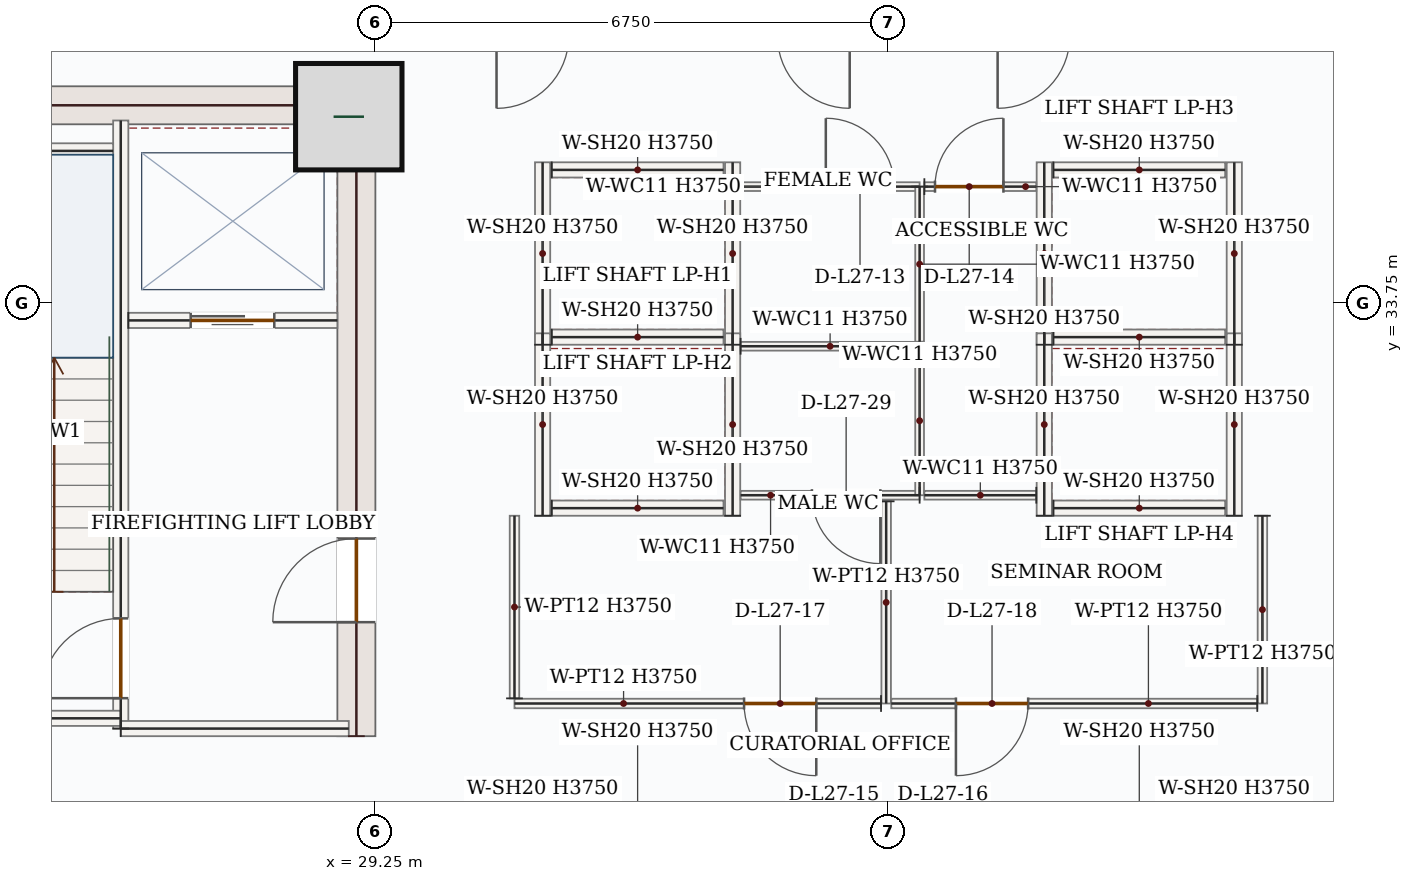
"""IFC4 building model, lengths in metres.
Left out: names, types, materials, properties, quantities, classifications, styles, units other than length and angle.
Written with IfcOpenShell. Run it as: python <this file> out.ifc"""

import sys

from ifc_helpers import new_model, si_unit, direction, frame, frame_2d, origin, origin_2d, place, context, subcontext, project, spatial, rectangle, extrude, source, transform, mapped, element, fill, save


model = new_model("IFC4")
c1 = context("Model", 3, precision=1e-05, world=origin(), true_north=direction((0.0, 1.0)))
c2 = subcontext(c1, "Body", "Model", "MODEL_VIEW")
j1 = project(units=[si_unit("LENGTHUNIT", "METRE"), si_unit("PLANEANGLEUNIT", "RADIAN")], contexts=[c1])
p1 = place(None, origin())
s1 = spatial("IfcSite", under=j1, at=p1, CompositionType="ELEMENT")
p2 = place(p1, origin())
s2 = spatial("IfcBuilding", under=s1, at=p2, CompositionType="ELEMENT")
p3 = place(p2, frame((0.0, 0.0, 121.5)))
s3 = spatial("IfcBuildingStorey", under=s2, at=p3, CompositionType="ELEMENT", Elevation=121.5)
p4 = place(p3, frame((29.0, 28.05, 0.0), z_axis=(0.0, 0.0, 1.0), x_axis=(0.0, 1.0, 0.0)))
e1 = element("IfcWall", 1, at=p4, inside=s3, PredefinedType="SHEAR", context=c2, shape_type="SweptSolid", body=[
    extrude(rectangle(XDim=8.55, YDim=0.5, at=frame_2d((4.275, 0.0))), origin(), (0.0, 0.0, 1.0), 3.75),
])
p5 = place(p4, frame((1.5, 0.0, 0.0)))
e2 = element("IfcOpeningElement", 2, at=p5, cuts=e1, PredefinedType="OPENING", context=c2, shape_type="SweptSolid", body=[
    extrude(rectangle(XDim=1.1, YDim=2.2, at=frame_2d((0.55, 1.1))), frame((0.0, 0.26, 0.0), z_axis=(0.0, -1.0, 0.0), x_axis=(1.0, 0.0, 0.0)), (0.0, 0.0, 1.0), 0.52),
])
m1 = source(origin(), c2, "Body", "SweptSolid", [
    extrude(rectangle(XDim=7.0, YDim=0.5, at=frame_2d((3.5, 0.0))), origin(), (0.0, 0.0, 1.0), 3.75),
])
p6 = place(p3, frame((21.75, 36.35, 0.0), z_axis=(0.0, 0.0, 1.0), x_axis=(1.0, 0.0, 0.0)))
e3 = element("IfcWall", 3, at=p6, inside=s3, PredefinedType="SHEAR", context=c2, shape_type="MappedRepresentation", body=[
    mapped(m1, transform((0.0, 0.0, 0.0), x_axis=(1.0, 0.0, 0.0), y_axis=(0.0, 1.0, 0.0), z_axis=(0.0, 0.0, 1.0), scale=1.0)),
])
m2 = source(origin(), c2, "Body", "SweptSolid", [
    extrude(rectangle(XDim=1.4, YDim=1.4, at=origin_2d()), origin(), (0.0, 0.0, 1.0), 4.2),
])
p7 = place(p3, frame((28.9, 36.2, 0.0), z_axis=(0.0, 0.0, 1.0), x_axis=(1.0, 0.0, 0.0)))
e4 = element("IfcColumn", 4, at=p7, inside=s3, PredefinedType="COLUMN", context=c2, shape_type="MappedRepresentation", body=[
    mapped(m2, transform((0.0, 0.0, 0.0), x_axis=(1.0, 0.0, 0.0), y_axis=(0.0, 1.0, 0.0), z_axis=(0.0, 0.0, 1.0), scale=1.0)),
])
p8 = place(p3, frame((25.9, 28.15, 0.0), z_axis=(0.0, 0.0, 1.0), x_axis=(0.0, 1.0, 0.0)))
e5 = element("IfcWall", 5, at=p8, inside=s3, PredefinedType="SOLIDWALL", context=c2, shape_type="SweptSolid", body=[
    extrude(rectangle(XDim=8.0, YDim=0.2, at=frame_2d((4.0, 0.0))), origin(), (0.0, 0.0, 1.0), 3.75),
])
p9 = place(p8, frame((0.4, 0.0, 0.0)))
e6 = element("IfcOpeningElement", 6, at=p9, cuts=e5, PredefinedType="OPENING", context=c2, shape_type="SweptSolid", body=[
    extrude(rectangle(XDim=1.05, YDim=2.15, at=frame_2d((0.525, 1.075))), frame((0.0, 0.11, 0.0), z_axis=(0.0, -1.0, 0.0), x_axis=(1.0, 0.0, 0.0)), (0.0, 0.0, 1.0), 0.22),
])
m3 = source(origin(), c2, "Body", "SweptSolid", [
    extrude(rectangle(XDim=4.25, YDim=0.2, at=frame_2d((2.125, 0.0))), origin(), (0.0, 0.0, 1.0), 3.75),
])
p10 = place(p3, frame((21.65, 28.285, 0.0), z_axis=(0.0, 0.0, 1.0), x_axis=(1.0, 0.0, 0.0)))
e7 = element("IfcWall", 7, at=p10, inside=s3, PredefinedType="SOLIDWALL", context=c2, shape_type="MappedRepresentation", body=[
    mapped(m3, transform((0.0, 0.0, 0.0), x_axis=(1.0, 0.0, 0.0), y_axis=(0.0, 1.0, 0.0), z_axis=(0.0, 0.0, 1.0), scale=1.0)),
])
m4 = source(origin(), c2, "Body", "SweptSolid", [
    extrude(rectangle(XDim=3.0, YDim=0.2, at=frame_2d((1.5, 0.0))), origin(), (0.0, 0.0, 1.0), 3.75),
])
p11 = place(p3, frame((25.9, 28.15, 0.0), z_axis=(0.0, 0.0, 1.0), x_axis=(1.0, 0.0, 0.0)))
e8 = element("IfcWall", 8, at=p11, inside=s3, PredefinedType="SOLIDWALL", context=c2, shape_type="MappedRepresentation", body=[
    mapped(m4, transform((0.0, 0.0, 0.0), x_axis=(1.0, 0.0, 0.0), y_axis=(0.0, 1.0, 0.0), z_axis=(0.0, 0.0, 1.0), scale=1.0)),
])
m5 = source(origin(), c2, "Body", "SweptSolid", [
    extrude(rectangle(XDim=3.25, YDim=0.2, at=frame_2d((1.625, 0.0))), origin(), (0.0, 0.0, 1.0), 3.75),
])
p12 = place(p3, frame((22.55, 35.75, 0.0), z_axis=(0.0, 0.0, 1.0), x_axis=(1.0, 0.0, 0.0)))
e9 = element("IfcWall", 9, at=p12, inside=s3, PredefinedType="SOLIDWALL", context=c2, shape_type="MappedRepresentation", body=[
    mapped(m5, transform((0.0, 0.0, 0.0), x_axis=(1.0, 0.0, 0.0), y_axis=(0.0, 1.0, 0.0), z_axis=(0.0, 0.0, 1.0), scale=1.0)),
])
p13 = place(p3, frame((26.0, 33.52, 0.0), z_axis=(0.0, 0.0, 1.0), x_axis=(1.0, 0.0, 0.0)))
e10 = element("IfcWall", 10, at=p13, inside=s3, PredefinedType="SOLIDWALL", context=c2, shape_type="SweptSolid", body=[
    extrude(rectangle(XDim=2.75, YDim=0.2, at=frame_2d((1.375, 0.0))), origin(), (0.0, 0.0, 1.0), 3.75),
])
p14 = place(p13, frame((0.82, 0.0, 0.0)))
e11 = element("IfcOpeningElement", 11, at=p14, cuts=e10, PredefinedType="OPENING", context=c2, shape_type="SweptSolid", body=[
    extrude(rectangle(XDim=1.1, YDim=2.15, at=frame_2d((0.55, 1.075))), frame((0.0, 0.11, 0.0), z_axis=(0.0, -1.0, 0.0), x_axis=(1.0, 0.0, 0.0)), (0.0, 0.0, 1.0), 0.22),
])
m6 = source(origin(), c2, "Body", "SweptSolid", [
    extrude(rectangle(XDim=2.4, YDim=0.2, at=frame_2d((1.2, 0.0))), origin(), (0.0, 0.0, 1.0), 3.75),
])
for number, where, z_axis, x_axis in (
    (12, (31.45, 33.2, 0.0), (0.0, 0.0, 1.0), (0.0, 1.0, 0.0)),
    (13, (33.95, 33.2, 0.0), (0.0, 0.0, 1.0), (0.0, 1.0, 0.0)),
):
    element("IfcWall", number, at=place(p3, frame(where, z_axis=z_axis, x_axis=x_axis)), inside=s3, PredefinedType="SOLIDWALL", context=c2, shape_type="MappedRepresentation", body=[
        mapped(m6, transform((0.0, 0.0, 0.0), x_axis=(1.0, 0.0, 0.0), y_axis=(0.0, 1.0, 0.0), z_axis=(0.0, 0.0, 1.0), scale=1.0)),
    ])
m7 = source(origin(), c2, "Body", "SweptSolid", [
    extrude(rectangle(XDim=2.26, YDim=0.2, at=frame_2d((1.13, 0.0))), origin(), (0.0, 0.0, 1.0), 3.75),
])
for number, where, z_axis, x_axis in (
    (14, (31.57, 33.3, 0.0), (0.0, 0.0, 1.0), (1.0, 0.0, 0.0)),
    (15, (31.57, 35.5, 0.0), (0.0, 0.0, 1.0), (1.0, 0.0, 0.0)),
):
    element("IfcWall", number, at=place(p3, frame(where, z_axis=z_axis, x_axis=x_axis)), inside=s3, PredefinedType="SOLIDWALL", context=c2, shape_type="MappedRepresentation", body=[
        mapped(m7, transform((0.0, 0.0, 0.0), x_axis=(1.0, 0.0, 0.0), y_axis=(0.0, 1.0, 0.0), z_axis=(0.0, 0.0, 1.0), scale=1.0)),
    ])
for number, where, z_axis, x_axis in (
    (16, (31.45, 30.95, 0.0), (0.0, 0.0, 1.0), (0.0, 1.0, 0.0)),
    (17, (33.95, 30.95, 0.0), (0.0, 0.0, 1.0), (0.0, 1.0, 0.0)),
):
    element("IfcWall", number, at=place(p3, frame(where, z_axis=z_axis, x_axis=x_axis)), inside=s3, PredefinedType="SOLIDWALL", context=c2, shape_type="MappedRepresentation", body=[
        mapped(m6, transform((0.0, 0.0, 0.0), x_axis=(1.0, 0.0, 0.0), y_axis=(0.0, 1.0, 0.0), z_axis=(0.0, 0.0, 1.0), scale=1.0)),
    ])
p15 = place(p3, frame((31.57, 31.05, 0.0), z_axis=(0.0, 0.0, 1.0), x_axis=(1.0, 0.0, 0.0)))
e18 = element("IfcWall", 18, at=p15, inside=s3, PredefinedType="SOLIDWALL", context=c2, shape_type="MappedRepresentation", body=[
    mapped(m7, transform((0.0, 0.0, 0.0), x_axis=(1.0, 0.0, 0.0), y_axis=(0.0, 1.0, 0.0), z_axis=(0.0, 0.0, 1.0), scale=1.0)),
])
for number, where, z_axis, x_axis in (
    (19, (38.05, 33.2, 0.0), (0.0, 0.0, 1.0), (0.0, 1.0, 0.0)),
    (20, (40.55, 33.2, 0.0), (0.0, 0.0, 1.0), (0.0, 1.0, 0.0)),
):
    element("IfcWall", number, at=place(p3, frame(where, z_axis=z_axis, x_axis=x_axis)), inside=s3, PredefinedType="SOLIDWALL", context=c2, shape_type="MappedRepresentation", body=[
        mapped(m6, transform((0.0, 0.0, 0.0), x_axis=(1.0, 0.0, 0.0), y_axis=(0.0, 1.0, 0.0), z_axis=(0.0, 0.0, 1.0), scale=1.0)),
    ])
for number, where, z_axis, x_axis in (
    (21, (38.17, 33.3, 0.0), (0.0, 0.0, 1.0), (1.0, 0.0, 0.0)),
    (22, (38.17, 35.5, 0.0), (0.0, 0.0, 1.0), (1.0, 0.0, 0.0)),
):
    element("IfcWall", number, at=place(p3, frame(where, z_axis=z_axis, x_axis=x_axis)), inside=s3, PredefinedType="SOLIDWALL", context=c2, shape_type="MappedRepresentation", body=[
        mapped(m7, transform((0.0, 0.0, 0.0), x_axis=(1.0, 0.0, 0.0), y_axis=(0.0, 1.0, 0.0), z_axis=(0.0, 0.0, 1.0), scale=1.0)),
    ])
for number, where, z_axis, x_axis in (
    (23, (38.05, 30.95, 0.0), (0.0, 0.0, 1.0), (0.0, 1.0, 0.0)),
    (24, (40.55, 30.95, 0.0), (0.0, 0.0, 1.0), (0.0, 1.0, 0.0)),
):
    element("IfcWall", number, at=place(p3, frame(where, z_axis=z_axis, x_axis=x_axis)), inside=s3, PredefinedType="SOLIDWALL", context=c2, shape_type="MappedRepresentation", body=[
        mapped(m6, transform((0.0, 0.0, 0.0), x_axis=(1.0, 0.0, 0.0), y_axis=(0.0, 1.0, 0.0), z_axis=(0.0, 0.0, 1.0), scale=1.0)),
    ])
p16 = place(p3, frame((38.17, 31.05, 0.0), z_axis=(0.0, 0.0, 1.0), x_axis=(1.0, 0.0, 0.0)))
e25 = element("IfcWall", 25, at=p16, inside=s3, PredefinedType="SOLIDWALL", context=c2, shape_type="MappedRepresentation", body=[
    mapped(m7, transform((0.0, 0.0, 0.0), x_axis=(1.0, 0.0, 0.0), y_axis=(0.0, 1.0, 0.0), z_axis=(0.0, 0.0, 1.0), scale=1.0)),
])
p17 = place(p3, frame((36.41, 31.22, 0.0), z_axis=(0.0, 0.0, 1.0), x_axis=(-1.0, 0.0, 0.0)))
e26 = element("IfcWall", 26, at=p17, inside=s3, PredefinedType="PARTITIONING", context=c2, shape_type="SweptSolid", body=[
    extrude(rectangle(XDim=2.355, YDim=0.115, at=frame_2d((1.177, 0.0))), origin(), (0.0, 0.0, 1.0), 3.75),
])
p18 = place(p17, frame((0.517, 0.0, 0.0)))
e27 = element("IfcOpeningElement", 27, at=p18, cuts=e26, PredefinedType="OPENING", context=c2, shape_type="SweptSolid", body=[
    extrude(rectangle(XDim=0.9, YDim=2.1, at=frame_2d((0.45, 1.05))), frame((0.0, 0.067, 0.0), z_axis=(0.0, -1.0, 0.0), x_axis=(1.0, 0.0, 0.0)), (0.0, 0.0, 1.0), 0.135),
])
m8 = source(origin(), c2, "Body", "SweptSolid", [
    extrude(rectangle(XDim=2.355, YDim=0.115, at=frame_2d((1.177, 0.0))), origin(), (0.0, 0.0, 1.0), 3.75),
])
p19 = place(p3, frame((34.055, 33.18, 0.0), z_axis=(0.0, 0.0, 1.0), x_axis=(1.0, 0.0, 0.0)))
e28 = element("IfcWall", 28, at=p19, inside=s3, PredefinedType="PARTITIONING", context=c2, shape_type="MappedRepresentation", body=[
    mapped(m8, transform((0.0, 0.0, 0.0), x_axis=(1.0, 0.0, 0.0), y_axis=(0.0, 1.0, 0.0), z_axis=(0.0, 0.0, 1.0), scale=1.0)),
])
m9 = source(origin(), c2, "Body", "SweptSolid", [
    extrude(rectangle(XDim=1.96, YDim=0.115, at=frame_2d((0.98, 0.0))), origin(), (0.0, 0.0, 1.0), 3.75),
])
p20 = place(p3, frame((36.41, 33.18, 0.0), z_axis=(0.0, 0.0, 1.0), x_axis=(0.0, -1.0, 0.0)))
e29 = element("IfcWall", 29, at=p20, inside=s3, PredefinedType="PARTITIONING", context=c2, shape_type="MappedRepresentation", body=[
    mapped(m9, transform((0.0, 0.0, 0.0), x_axis=(1.0, 0.0, 0.0), y_axis=(0.0, 1.0, 0.0), z_axis=(0.0, 0.0, 1.0), scale=1.0)),
])
p21 = place(p3, frame((34.055, 35.28, 0.0), z_axis=(0.0, 0.0, 1.0), x_axis=(1.0, 0.0, 0.0)))
e30 = element("IfcWall", 30, at=p21, inside=s3, PredefinedType="PARTITIONING", context=c2, shape_type="SweptSolid", body=[
    extrude(rectangle(XDim=2.355, YDim=0.115, at=frame_2d((1.177, 0.0))), origin(), (0.0, 0.0, 1.0), 3.75),
])
p22 = place(p21, frame((1.121, 0.0, 0.0)))
e31 = element("IfcOpeningElement", 31, at=p22, cuts=e30, PredefinedType="OPENING", context=c2, shape_type="SweptSolid", body=[
    extrude(rectangle(XDim=0.9, YDim=2.1, at=frame_2d((0.45, 1.05))), frame((0.0, 0.067, 0.0), z_axis=(0.0, -1.0, 0.0), x_axis=(1.0, 0.0, 0.0)), (0.0, 0.0, 1.0), 0.135),
])
m10 = source(origin(), c2, "Body", "SweptSolid", [
    extrude(rectangle(XDim=2.04, YDim=0.115, at=frame_2d((1.02, 0.0))), origin(), (0.0, 0.0, 1.0), 3.75),
])
p23 = place(p3, frame((36.41, 35.28, 0.0), z_axis=(0.0, 0.0, 1.0), x_axis=(0.0, -1.0, 0.0)))
e32 = element("IfcWall", 32, at=p23, inside=s3, PredefinedType="PARTITIONING", context=c2, shape_type="MappedRepresentation", body=[
    mapped(m10, transform((0.0, 0.0, 0.0), x_axis=(1.0, 0.0, 0.0), y_axis=(0.0, 1.0, 0.0), z_axis=(0.0, 0.0, 1.0), scale=1.0)),
])
m11 = source(origin(), c2, "Body", "SweptSolid", [
    extrude(rectangle(XDim=1.473, YDim=0.115, at=frame_2d((0.736, 0.0))), origin(), (0.0, 0.0, 1.0), 3.75),
])
p24 = place(p3, frame((37.945, 31.22, 0.0), z_axis=(0.0, 0.0, 1.0), x_axis=(-1.0, 0.0, 0.0)))
e33 = element("IfcWall", 33, at=p24, inside=s3, PredefinedType="PARTITIONING", context=c2, shape_type="MappedRepresentation", body=[
    mapped(m11, transform((0.0, 0.0, 0.0), x_axis=(1.0, 0.0, 0.0), y_axis=(0.0, 1.0, 0.0), z_axis=(0.0, 0.0, 1.0), scale=1.0)),
])
p25 = place(p3, frame((36.472, 35.28, 0.0), z_axis=(0.0, 0.0, 1.0), x_axis=(1.0, 0.0, 0.0)))
e34 = element("IfcWall", 34, at=p25, inside=s3, PredefinedType="PARTITIONING", context=c2, shape_type="SweptSolid", body=[
    extrude(rectangle(XDim=1.473, YDim=0.115, at=frame_2d((0.736, 0.0))), origin(), (0.0, 0.0, 1.0), 3.75),
])
p26 = place(p25, frame((0.14, 0.0, 0.0)))
e35 = element("IfcOpeningElement", 35, at=p26, cuts=e34, PredefinedType="OPENING", context=c2, shape_type="SweptSolid", body=[
    extrude(rectangle(XDim=0.9, YDim=2.1, at=frame_2d((0.45, 1.05))), frame((0.0, 0.067, 0.0), z_axis=(0.0, -1.0, 0.0), x_axis=(1.0, 0.0, 0.0)), (0.0, 0.0, 1.0), 0.135),
])
m12 = source(origin(), c2, "Body", "SweptSolid", [
    extrude(rectangle(XDim=2.66, YDim=0.125, at=frame_2d((1.33, 0.0))), origin(), (0.0, 0.0, 1.0), 3.75),
])
p27 = place(p3, frame((35.97, 31.14, 0.0), z_axis=(0.0, 0.0, 1.0), x_axis=(0.0, -1.0, 0.0)))
e36 = element("IfcWall", 36, at=p27, inside=s3, PredefinedType="PARTITIONING", context=c2, shape_type="MappedRepresentation", body=[
    mapped(m12, transform((0.0, 0.0, 0.0), x_axis=(1.0, 0.0, 0.0), y_axis=(0.0, 1.0, 0.0), z_axis=(0.0, 0.0, 1.0), scale=1.0)),
])
p28 = place(p3, frame((35.903, 28.48, 0.0), z_axis=(0.0, 0.0, 1.0), x_axis=(-1.0, 0.0, 0.0)))
e37 = element("IfcWall", 37, at=p28, inside=s3, PredefinedType="PARTITIONING", context=c2, shape_type="SweptSolid", body=[
    extrude(rectangle(XDim=4.823, YDim=0.125, at=frame_2d((2.411, 0.0))), origin(), (0.0, 0.0, 1.0), 3.75),
])
p29 = place(p28, frame((0.852, 0.0, 0.0)))
e38 = element("IfcOpeningElement", 38, at=p29, cuts=e37, PredefinedType="OPENING", context=c2, shape_type="SweptSolid", body=[
    extrude(rectangle(XDim=0.95, YDim=2.15, at=frame_2d((0.475, 1.075))), frame((0.0, 0.073, 0.0), z_axis=(0.0, -1.0, 0.0), x_axis=(1.0, 0.0, 0.0)), (0.0, 0.0, 1.0), 0.145),
])
m13 = source(origin(), c2, "Body", "SweptSolid", [
    extrude(rectangle(XDim=2.402, YDim=0.125, at=frame_2d((1.201, 0.0))), origin(), (0.0, 0.0, 1.0), 3.75),
])
p30 = place(p3, frame((31.08, 28.548, 0.0), z_axis=(0.0, 0.0, 1.0), x_axis=(0.0, 1.0, 0.0)))
e39 = element("IfcWall", 39, at=p30, inside=s3, PredefinedType="PARTITIONING", context=c2, shape_type="MappedRepresentation", body=[
    mapped(m13, transform((0.0, 0.0, 0.0), x_axis=(1.0, 0.0, 0.0), y_axis=(0.0, 1.0, 0.0), z_axis=(0.0, 0.0, 1.0), scale=1.0)),
])
m14 = source(origin(), c2, "Body", "SweptSolid", [
    extrude(rectangle(XDim=2.47, YDim=0.125, at=frame_2d((1.235, 0.0))), origin(), (0.0, 0.0, 1.0), 3.75),
])
p31 = place(p3, frame((40.92, 30.95, 0.0), z_axis=(0.0, 0.0, 1.0), x_axis=(0.0, -1.0, 0.0)))
e40 = element("IfcWall", 40, at=p31, inside=s3, PredefinedType="PARTITIONING", context=c2, shape_type="MappedRepresentation", body=[
    mapped(m14, transform((0.0, 0.0, 0.0), x_axis=(1.0, 0.0, 0.0), y_axis=(0.0, 1.0, 0.0), z_axis=(0.0, 0.0, 1.0), scale=1.0)),
])
p32 = place(p3, frame((40.853, 28.48, 0.0), z_axis=(0.0, 0.0, 1.0), x_axis=(-1.0, 0.0, 0.0)))
e41 = element("IfcWall", 41, at=p32, inside=s3, PredefinedType="PARTITIONING", context=c2, shape_type="SweptSolid", body=[
    extrude(rectangle(XDim=4.815, YDim=0.125, at=frame_2d((2.407, 0.0))), origin(), (0.0, 0.0, 1.0), 3.75),
])
p33 = place(p32, frame((3.015, 0.0, 0.0)))
e42 = element("IfcOpeningElement", 42, at=p33, cuts=e41, PredefinedType="OPENING", context=c2, shape_type="SweptSolid", body=[
    extrude(rectangle(XDim=0.95, YDim=2.15, at=frame_2d((0.475, 1.075))), frame((0.0, 0.073, 0.0), z_axis=(0.0, -1.0, 0.0), x_axis=(1.0, 0.0, 0.0)), (0.0, 0.0, 1.0), 0.145),
])
m15 = source(origin(), c2, "Body", "SweptSolid", [
    extrude(rectangle(XDim=1.05, YDim=2.15, at=frame_2d((0.525, 1.075))), frame((0.0, 0.025, 0.0), z_axis=(0.0, -1.0, 0.0), x_axis=(1.0, 0.0, 0.0)), (0.0, 0.0, 1.0), 0.05),
])
p34 = place(p9, origin())
e43 = element("IfcDoor", 43, at=p34, inside=s3, OperationType="SINGLE_SWING_LEFT", PredefinedType="DOOR", context=c2, shape_type="MappedRepresentation", body=[
    mapped(m15, transform((0.0, 0.0, 0.0), x_axis=(1.0, 0.0, 0.0), y_axis=(0.0, 1.0, 0.0), z_axis=(0.0, 0.0, 1.0), scale=1.0)),
])
fill(e6, e43)
m16 = source(origin(), c2, "Body", "SweptSolid", [
    extrude(rectangle(XDim=1.1, YDim=2.15, at=frame_2d((0.55, 1.075))), frame((0.0, 0.025, 0.0), z_axis=(0.0, -1.0, 0.0), x_axis=(1.0, 0.0, 0.0)), (0.0, 0.0, 1.0), 0.05),
])
p35 = place(p14, origin())
e44 = element("IfcDoor", 44, at=p35, inside=s3, OperationType="DOUBLE_DOOR_SLIDING", PredefinedType="DOOR", context=c2, shape_type="MappedRepresentation", body=[
    mapped(m16, transform((0.0, 0.0, 0.0), x_axis=(1.0, 0.0, 0.0), y_axis=(0.0, 1.0, 0.0), z_axis=(0.0, 0.0, 1.0), scale=1.0)),
])
fill(e11, e44)
m17 = source(origin(), c2, "Body", "SweptSolid", [
    extrude(rectangle(XDim=1.1, YDim=2.2, at=frame_2d((0.55, 1.1))), frame((0.0, 0.025, 0.0), z_axis=(0.0, -1.0, 0.0), x_axis=(1.0, 0.0, 0.0)), (0.0, 0.0, 1.0), 0.05),
])
p36 = place(p5, origin())
e45 = element("IfcDoor", 45, at=p36, inside=s3, OperationType="SINGLE_SWING_LEFT", PredefinedType="DOOR", context=c2, shape_type="MappedRepresentation", body=[
    mapped(m17, transform((0.0, 0.0, 0.0), x_axis=(1.0, 0.0, 0.0), y_axis=(0.0, 1.0, 0.0), z_axis=(0.0, 0.0, 1.0), scale=1.0)),
])
fill(e2, e45)
m18 = source(origin(), c2, "Body", "SweptSolid", [
    extrude(rectangle(XDim=0.9, YDim=2.1, at=frame_2d((0.45, 1.05))), frame((0.0, 0.025, 0.0), z_axis=(0.0, -1.0, 0.0), x_axis=(1.0, 0.0, 0.0)), (0.0, 0.0, 1.0), 0.05),
])
p37 = place(p22, origin())
e46 = element("IfcDoor", 46, at=p37, inside=s3, OperationType="SINGLE_SWING_LEFT", PredefinedType="DOOR", context=c2, shape_type="MappedRepresentation", body=[
    mapped(m18, transform((0.0, 0.0, 0.0), x_axis=(1.0, 0.0, 0.0), y_axis=(0.0, 1.0, 0.0), z_axis=(0.0, 0.0, 1.0), scale=1.0)),
])
fill(e31, e46)
p38 = place(p26, origin())
e47 = element("IfcDoor", 47, at=p38, inside=s3, OperationType="SINGLE_SWING_RIGHT", PredefinedType="DOOR", context=c2, shape_type="MappedRepresentation", body=[
    mapped(m18, transform((0.0, 0.0, 0.0), x_axis=(1.0, 0.0, 0.0), y_axis=(0.0, 1.0, 0.0), z_axis=(0.0, 0.0, 1.0), scale=1.0)),
])
fill(e35, e47)
m19 = source(origin(), c2, "Body", "SweptSolid", [
    extrude(rectangle(XDim=0.95, YDim=2.15, at=frame_2d((0.475, 1.075))), frame((0.0, 0.025, 0.0), z_axis=(0.0, -1.0, 0.0), x_axis=(1.0, 0.0, 0.0)), (0.0, 0.0, 1.0), 0.05),
])
p39 = place(p29, origin())
e48 = element("IfcDoor", 48, at=p39, inside=s3, OperationType="SINGLE_SWING_LEFT", PredefinedType="DOOR", context=c2, shape_type="MappedRepresentation", body=[
    mapped(m19, transform((0.0, 0.0, 0.0), x_axis=(1.0, 0.0, 0.0), y_axis=(0.0, 1.0, 0.0), z_axis=(0.0, 0.0, 1.0), scale=1.0)),
])
fill(e38, e48)
p40 = place(p33, origin())
e49 = element("IfcDoor", 49, at=p40, inside=s3, OperationType="SINGLE_SWING_RIGHT", PredefinedType="DOOR", context=c2, shape_type="MappedRepresentation", body=[
    mapped(m19, transform((0.0, 0.0, 0.0), x_axis=(1.0, 0.0, 0.0), y_axis=(0.0, 1.0, 0.0), z_axis=(0.0, 0.0, 1.0), scale=1.0)),
])
fill(e42, e49)
p41 = place(p18, origin())
e50 = element("IfcDoor", 50, at=p41, inside=s3, OperationType="SINGLE_SWING_LEFT", PredefinedType="DOOR", context=c2, shape_type="MappedRepresentation", body=[
    mapped(m18, transform((0.0, 0.0, 0.0), x_axis=(1.0, 0.0, 0.0), y_axis=(0.0, 1.0, 0.0), z_axis=(0.0, 0.0, 1.0), scale=1.0)),
])
fill(e27, e50)
save(model, sys.argv[1])
